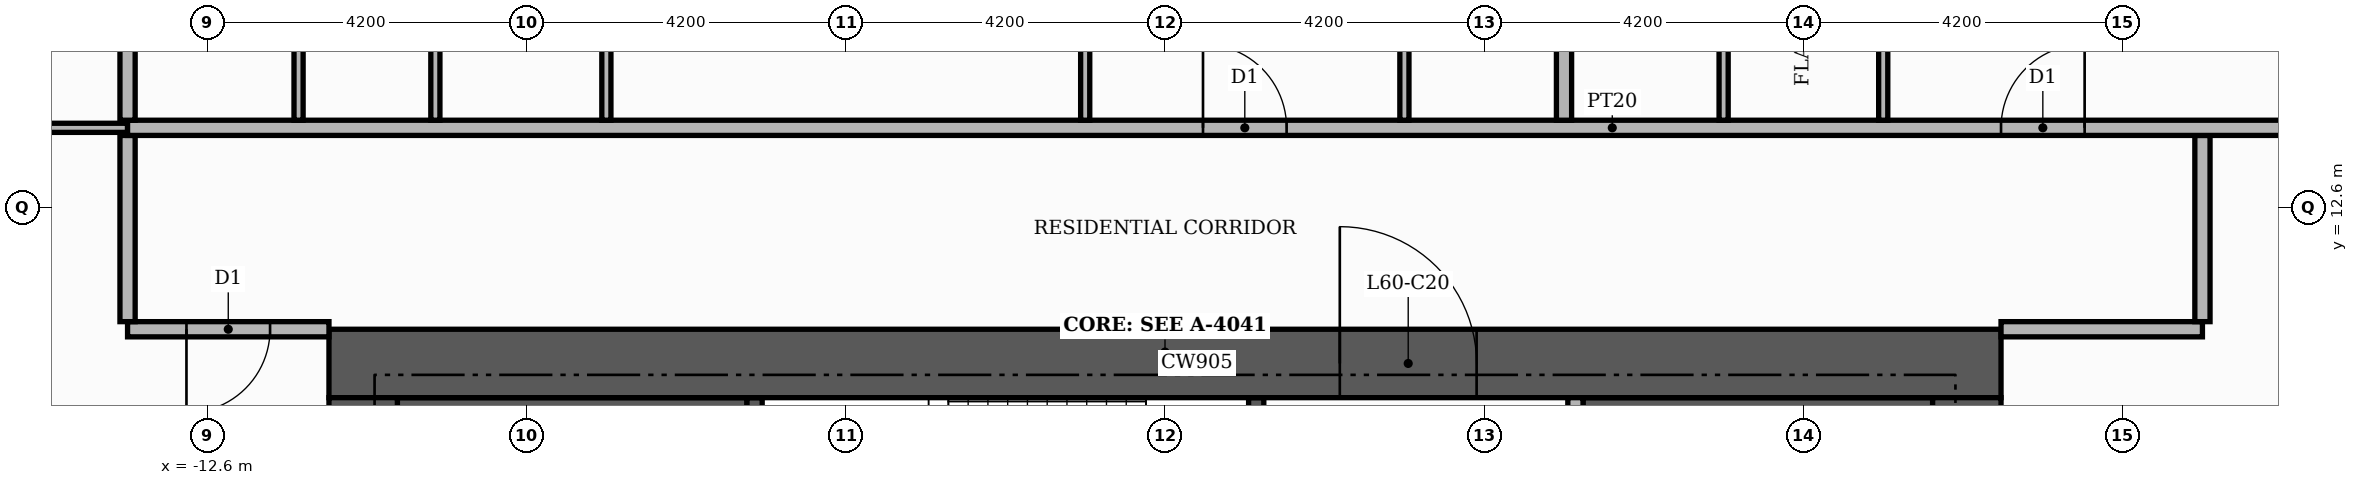
"""IFC4 building model, lengths in metres.
Left out: names, types, materials, properties, quantities, classifications, styles, units other than length and angle.
Written with IfcOpenShell. Run it as: python <this file> out.ifc"""

import sys

from ifc_helpers import new_model, si_unit, direction, frame, frame_2d, origin, place, context, subcontext, project, spatial, rectangle, extrude, element, fill, save


model = new_model("IFC4")
c1 = context("Model", 3, precision=1e-05, world=origin(), true_north=direction((0.0, 1.0)))
c2 = subcontext(c1, "Body", "Model", "MODEL_VIEW")
j1 = project(units=[si_unit("LENGTHUNIT", "METRE"), si_unit("PLANEANGLEUNIT", "RADIAN")], contexts=[c1])
p1 = place(None, origin())
s1 = spatial("IfcSite", under=j1, at=p1, CompositionType="ELEMENT")
p2 = place(p1, origin())
s2 = spatial("IfcBuilding", under=s1, at=p2, CompositionType="ELEMENT")
p3 = place(p2, frame((0.0, 0.0, 252.3)))
s3 = spatial("IfcBuildingStorey", under=s2, at=p3, CompositionType="ELEMENT", Elevation=252.3)
for number, where, z_axis, x_axis in (
    (1, (-10.1, 9.15, 0.0), (0.0, 0.0, 1.0), (1.0, 0.0, 0.0)),
    (2, (5.5, 9.15, 0.0), (0.0, 0.0, 1.0), (1.0, 0.0, 0.0)),
):
    element("IfcWall", number, at=place(p3, frame(where, z_axis=z_axis, x_axis=x_axis)), inside=s3, PredefinedType="SHEAR", context=c2, shape_type="SweptSolid", body=[
        extrude(rectangle(XDim=4.6, YDim=1.9, at=frame_2d((2.3, 0.0))), origin(), (0.0, 0.0, 1.0), 3.48),
    ])
p4 = place(p3, frame((-5.4, 7.25, 0.0), z_axis=(0.0, 0.0, 1.0), x_axis=(0.0, 1.0, 0.0)))
e3 = element("IfcWall", 3, at=p4, inside=s3, PredefinedType="SHEAR", context=c2, shape_type="SweptSolid", body=[
    extrude(rectangle(XDim=2.85, YDim=0.2, at=frame_2d((1.425, 0.0))), origin(), (0.0, 0.0, 1.0), 3.48),
])
p5 = place(p3, frame((1.2, 7.25, 0.0), z_axis=(0.0, 0.0, 1.0), x_axis=(0.0, 1.0, 0.0)))
e4 = element("IfcWall", 4, at=p5, inside=s3, PredefinedType="SHEAR", context=c2, shape_type="SweptSolid", body=[
    extrude(rectangle(XDim=2.85, YDim=0.2, at=frame_2d((1.425, 0.0))), origin(), (0.0, 0.0, 1.0), 3.48),
])
p6 = place(p5, frame((0.85, 0.0, 0.0)))
e5 = element("IfcOpeningElement", 5, at=p6, cuts=e4, PredefinedType="OPENING", context=c2, shape_type="SweptSolid", body=[
    extrude(rectangle(XDim=1.0, YDim=2.1, at=frame_2d((0.5, 1.05))), frame((0.0, 0.11, 0.0), z_axis=(0.0, -1.0, 0.0), x_axis=(1.0, 0.0, 0.0)), (0.0, 0.0, 1.0), 0.22),
])
p7 = place(p3, frame((-11.0, 10.55, 0.0), z_axis=(0.0, 0.0, 1.0), x_axis=(1.0, 0.0, 0.0)))
e6 = element("IfcWall", 6, at=p7, inside=s3, PredefinedType="SHEAR", context=c2, shape_type="SweptSolid", body=[
    extrude(rectangle(XDim=22.0, YDim=0.9, at=frame_2d((11.0, 0.0))), origin(), (0.0, 0.0, 1.0), 3.48),
])
p8 = place(p7, frame((13.3, 0.0, 0.0)))
e7 = element("IfcOpeningElement", 7, at=p8, cuts=e6, PredefinedType="OPENING", context=c2, shape_type="SweptSolid", body=[
    extrude(rectangle(XDim=1.8, YDim=2.2, at=frame_2d((0.9, 1.1))), frame((0.0, 0.46, 0.0), z_axis=(0.0, -1.0, 0.0), x_axis=(1.0, 0.0, 0.0)), (0.0, 0.0, 1.0), 0.92),
])
for number, where, z_axis, x_axis in (
    (8, (-10.55, -10.1, 0.0), (0.0, 0.0, 1.0), (0.0, 1.0, 0.0)),
    (9, (10.55, -10.1, 0.0), (0.0, 0.0, 1.0), (0.0, 1.0, 0.0)),
):
    element("IfcWall", number, at=place(p3, frame(where, z_axis=z_axis, x_axis=x_axis)), inside=s3, PredefinedType="SHEAR", context=c2, shape_type="SweptSolid", body=[
        extrude(rectangle(XDim=20.2, YDim=0.9, at=frame_2d((10.1, 0.0))), origin(), (0.0, 0.0, 1.0), 3.48),
    ])
p9 = place(p3, frame((5.4, 5.5, 0.0), z_axis=(0.0, 0.0, 1.0), x_axis=(0.0, 1.0, 0.0)))
e10 = element("IfcWall", 10, at=p9, inside=s3, PredefinedType="PARTITIONING", context=c2, shape_type="SweptSolid", body=[
    extrude(rectangle(XDim=4.6, YDim=0.2, at=frame_2d((2.3, 0.0))), origin(), (0.0, 0.0, 1.0), 3.48),
])
p10 = place(p9, frame((0.25, 0.0, 0.0)))
e11 = element("IfcOpeningElement", 11, at=p10, cuts=e10, PredefinedType="OPENING", context=c2, shape_type="SweptSolid", body=[
    extrude(rectangle(XDim=1.0, YDim=2.1, at=frame_2d((0.5, 1.05))), frame((0.0, 0.11, 0.0), z_axis=(0.0, -1.0, 0.0), x_axis=(1.0, 0.0, 0.0)), (0.0, 0.0, 1.0), 0.22),
])
p11 = place(p3, frame((-13.65, 11.0, 0.0), z_axis=(0.0, 0.0, 1.0), x_axis=(1.0, 0.0, 0.0)))
e12 = element("IfcWall", 12, at=p11, inside=s3, PredefinedType="PARTITIONING", context=c2, shape_type="SweptSolid", body=[
    extrude(rectangle(XDim=2.65, YDim=0.2, at=frame_2d((1.325, 0.0))), origin(), (0.0, 0.0, 1.0), 3.48),
])
p12 = place(p11, frame((0.775, 0.0, 0.0)))
e13 = element("IfcOpeningElement", 13, at=p12, cuts=e12, PredefinedType="OPENING", context=c2, shape_type="SweptSolid", body=[
    extrude(rectangle(XDim=1.1, YDim=2.4, at=frame_2d((0.55, 1.2))), frame((0.0, 0.11, 0.0), z_axis=(0.0, -1.0, 0.0), x_axis=(1.0, 0.0, 0.0)), (0.0, 0.0, 1.0), 0.22),
])
p13 = place(p3, frame((11.0, 11.0, 0.0), z_axis=(0.0, 0.0, 1.0), x_axis=(1.0, 0.0, 0.0)))
e14 = element("IfcWall", 14, at=p13, inside=s3, PredefinedType="PARTITIONING", context=c2, shape_type="SweptSolid", body=[
    extrude(rectangle(XDim=2.65, YDim=0.2, at=frame_2d((1.325, 0.0))), origin(), (0.0, 0.0, 1.0), 3.48),
])
for number, where, z_axis, x_axis in (
    (15, (-13.65, 11.1, 0.0), (0.0, 0.0, 1.0), (0.0, 1.0, 0.0)),
    (16, (13.65, 11.1, 0.0), (0.0, 0.0, 1.0), (0.0, 1.0, 0.0)),
):
    element("IfcWall", number, at=place(p3, frame(where, z_axis=z_axis, x_axis=x_axis)), inside=s3, PredefinedType="PARTITIONING", context=c2, shape_type="SweptSolid", body=[
        extrude(rectangle(XDim=2.45, YDim=0.2, at=frame_2d((1.225, 0.0))), origin(), (0.0, 0.0, 1.0), 3.48),
    ])
p14 = place(p3, frame((-20.12, 13.65, 0.0), z_axis=(0.0, 0.0, 1.0), x_axis=(1.0, 0.0, 0.0)))
e17 = element("IfcWall", 17, at=p14, inside=s3, PredefinedType="PARTITIONING", context=c2, shape_type="SweptSolid", body=[
    extrude(rectangle(XDim=6.47, YDim=0.12, at=frame_2d((3.235, 0.0))), origin(), (0.0, 0.0, 1.0), 3.48),
])
p15 = place(p14, frame((2.785, 0.0, 0.0)))
e18 = element("IfcOpeningElement", 18, at=p15, cuts=e17, PredefinedType="OPENING", context=c2, shape_type="SweptSolid", body=[
    extrude(rectangle(XDim=0.9, YDim=2.1, at=frame_2d((0.45, 1.05))), frame((0.0, 0.07, 0.0), z_axis=(0.0, -1.0, 0.0), x_axis=(1.0, 0.0, 0.0)), (0.0, 0.0, 1.0), 0.14),
])
p16 = place(p3, frame((-13.65, 13.65, 0.0), z_axis=(0.0, 0.0, 1.0), x_axis=(1.0, 0.0, 0.0)))
e19 = element("IfcWall", 19, at=p16, inside=s3, PredefinedType="PARTITIONING", context=c2, shape_type="SweptSolid", body=[
    extrude(rectangle(XDim=39.07, YDim=0.2, at=frame_2d((19.535, 0.0))), origin(), (0.0, 0.0, 1.0), 3.48),
])
p17 = place(p16, frame((24.65, 0.0, 0.0)))
e20 = element("IfcOpeningElement", 20, at=p17, cuts=e19, PredefinedType="OPENING", context=c2, shape_type="SweptSolid", body=[
    extrude(rectangle(XDim=1.1, YDim=2.4, at=frame_2d((0.55, 1.2))), frame((0.0, 0.11, 0.0), z_axis=(0.0, -1.0, 0.0), x_axis=(1.0, 0.0, 0.0)), (0.0, 0.0, 1.0), 0.22),
])
p18 = place(p16, frame((14.15, 0.0, 0.0)))
e21 = element("IfcOpeningElement", 21, at=p18, cuts=e19, PredefinedType="OPENING", context=c2, shape_type="SweptSolid", body=[
    extrude(rectangle(XDim=1.1, YDim=2.4, at=frame_2d((0.55, 1.2))), frame((0.0, 0.11, 0.0), z_axis=(0.0, -1.0, 0.0), x_axis=(1.0, 0.0, 0.0)), (0.0, 0.0, 1.0), 0.22),
])
p19 = place(p3, frame((-13.65, 13.75, 0.0), z_axis=(0.0, 0.0, 1.0), x_axis=(0.0, 1.0, 0.0)))
e22 = element("IfcWall", 22, at=p19, inside=s3, PredefinedType="PARTITIONING", context=c2, shape_type="SweptSolid", body=[
    extrude(rectangle(XDim=11.67, YDim=0.2, at=frame_2d((5.835, 0.0))), origin(), (0.0, 0.0, 1.0), 3.48),
])
for number, where, z_axis, x_axis in (
    (23, (-11.4, 13.75, 0.0), (0.0, 0.0, 1.0), (0.0, 1.0, 0.0)),
    (24, (-9.6, 13.75, 0.0), (0.0, 0.0, 1.0), (0.0, 1.0, 0.0)),
    (25, (-7.35, 13.75, 0.0), (0.0, 0.0, 1.0), (0.0, 1.0, 0.0)),
    (26, (-1.05, 13.75, 0.0), (0.0, 0.0, 1.0), (0.0, 1.0, 0.0)),
):
    element("IfcWall", number, at=place(p3, frame(where, z_axis=z_axis, x_axis=x_axis)), inside=s3, PredefinedType="PARTITIONING", context=c2, shape_type="SweptSolid", body=[
        extrude(rectangle(XDim=5.41, YDim=0.12, at=frame_2d((2.705, 0.0))), origin(), (0.0, 0.0, 1.0), 3.48),
    ])
p20 = place(p3, frame((3.15, 13.75, 0.0), z_axis=(0.0, 0.0, 1.0), x_axis=(0.0, 1.0, 0.0)))
e27 = element("IfcWall", 27, at=p20, inside=s3, PredefinedType="PARTITIONING", context=c2, shape_type="SweptSolid", body=[
    extrude(rectangle(XDim=5.41, YDim=0.12, at=frame_2d((2.705, 0.0))), origin(), (0.0, 0.0, 1.0), 3.48),
])
p21 = place(p20, frame((2.235, 0.0, 0.0)))
e28 = element("IfcOpeningElement", 28, at=p21, cuts=e27, PredefinedType="OPENING", context=c2, shape_type="SweptSolid", body=[
    extrude(rectangle(XDim=0.9, YDim=2.1, at=frame_2d((0.45, 1.05))), frame((0.0, 0.07, 0.0), z_axis=(0.0, -1.0, 0.0), x_axis=(1.0, 0.0, 0.0)), (0.0, 0.0, 1.0), 0.14),
])
p22 = place(p3, frame((5.25, 13.75, 0.0), z_axis=(0.0, 0.0, 1.0), x_axis=(0.0, 1.0, 0.0)))
e29 = element("IfcWall", 29, at=p22, inside=s3, PredefinedType="PARTITIONING", context=c2, shape_type="SweptSolid", body=[
    extrude(rectangle(XDim=11.67, YDim=0.2, at=frame_2d((5.835, 0.0))), origin(), (0.0, 0.0, 1.0), 3.48),
])
p23 = place(p3, frame((7.35, 13.75, 0.0), z_axis=(0.0, 0.0, 1.0), x_axis=(0.0, 1.0, 0.0)))
e30 = element("IfcWall", 30, at=p23, inside=s3, PredefinedType="PARTITIONING", context=c2, shape_type="SweptSolid", body=[
    extrude(rectangle(XDim=5.11, YDim=0.12, at=frame_2d((2.555, 0.0))), origin(), (0.0, 0.0, 1.0), 3.48),
])
p24 = place(p3, frame((9.45, 13.75, 0.0), z_axis=(0.0, 0.0, 1.0), x_axis=(0.0, 1.0, 0.0)))
e31 = element("IfcWall", 31, at=p24, inside=s3, PredefinedType="PARTITIONING", context=c2, shape_type="SweptSolid", body=[
    extrude(rectangle(XDim=5.11, YDim=0.12, at=frame_2d((2.555, 0.0))), origin(), (0.0, 0.0, 1.0), 3.48),
])
p25 = place(p24, frame((2.085, 0.0, 0.0)))
e32 = element("IfcOpeningElement", 32, at=p25, cuts=e31, PredefinedType="OPENING", context=c2, shape_type="SweptSolid", body=[
    extrude(rectangle(XDim=0.9, YDim=2.1, at=frame_2d((0.45, 1.05))), frame((0.0, 0.07, 0.0), z_axis=(0.0, -1.0, 0.0), x_axis=(1.0, 0.0, 0.0)), (0.0, 0.0, 1.0), 0.14),
])
p26 = place(p8, origin())
e33 = element("IfcDoor", 33, at=p26, inside=s3, OperationType="DOUBLE_DOOR_SINGLE_SWING", PredefinedType="DOOR", context=c2, shape_type="SweptSolid", body=[
    extrude(rectangle(XDim=1.8, YDim=2.2, at=frame_2d((0.9, 1.1))), frame((0.0, 0.025, 0.0), z_axis=(0.0, -1.0, 0.0), x_axis=(1.0, 0.0, 0.0)), (0.0, 0.0, 1.0), 0.05),
])
fill(e7, e33)
p27 = place(p17, origin())
e34 = element("IfcDoor", 34, at=p27, inside=s3, OperationType="SINGLE_SWING_RIGHT", PredefinedType="DOOR", context=c2, shape_type="SweptSolid", body=[
    extrude(rectangle(XDim=1.1, YDim=2.4, at=frame_2d((0.55, 1.2))), frame((0.0, 0.025, 0.0), z_axis=(0.0, -1.0, 0.0), x_axis=(1.0, 0.0, 0.0)), (0.0, 0.0, 1.0), 0.05),
])
fill(e20, e34)
p28 = place(p18, origin())
e35 = element("IfcDoor", 35, at=p28, inside=s3, OperationType="SINGLE_SWING_LEFT", PredefinedType="DOOR", context=c2, shape_type="SweptSolid", body=[
    extrude(rectangle(XDim=1.1, YDim=2.4, at=frame_2d((0.55, 1.2))), frame((0.0, 0.025, 0.0), z_axis=(0.0, -1.0, 0.0), x_axis=(1.0, 0.0, 0.0)), (0.0, 0.0, 1.0), 0.05),
])
fill(e21, e35)
p29 = place(p12, frame((1.1, 0.0, 0.0), z_axis=(0.0, 0.0, 1.0), x_axis=(-1.0, 0.0, 0.0)))
e36 = element("IfcDoor", 36, at=p29, inside=s3, OperationType="SINGLE_SWING_LEFT", PredefinedType="DOOR", context=c2, shape_type="SweptSolid", body=[
    extrude(rectangle(XDim=1.1, YDim=2.4, at=frame_2d((0.55, 1.2))), frame((0.0, 0.025, 0.0), z_axis=(0.0, -1.0, 0.0), x_axis=(1.0, 0.0, 0.0)), (0.0, 0.0, 1.0), 0.05),
])
fill(e13, e36)
save(model, sys.argv[1])
